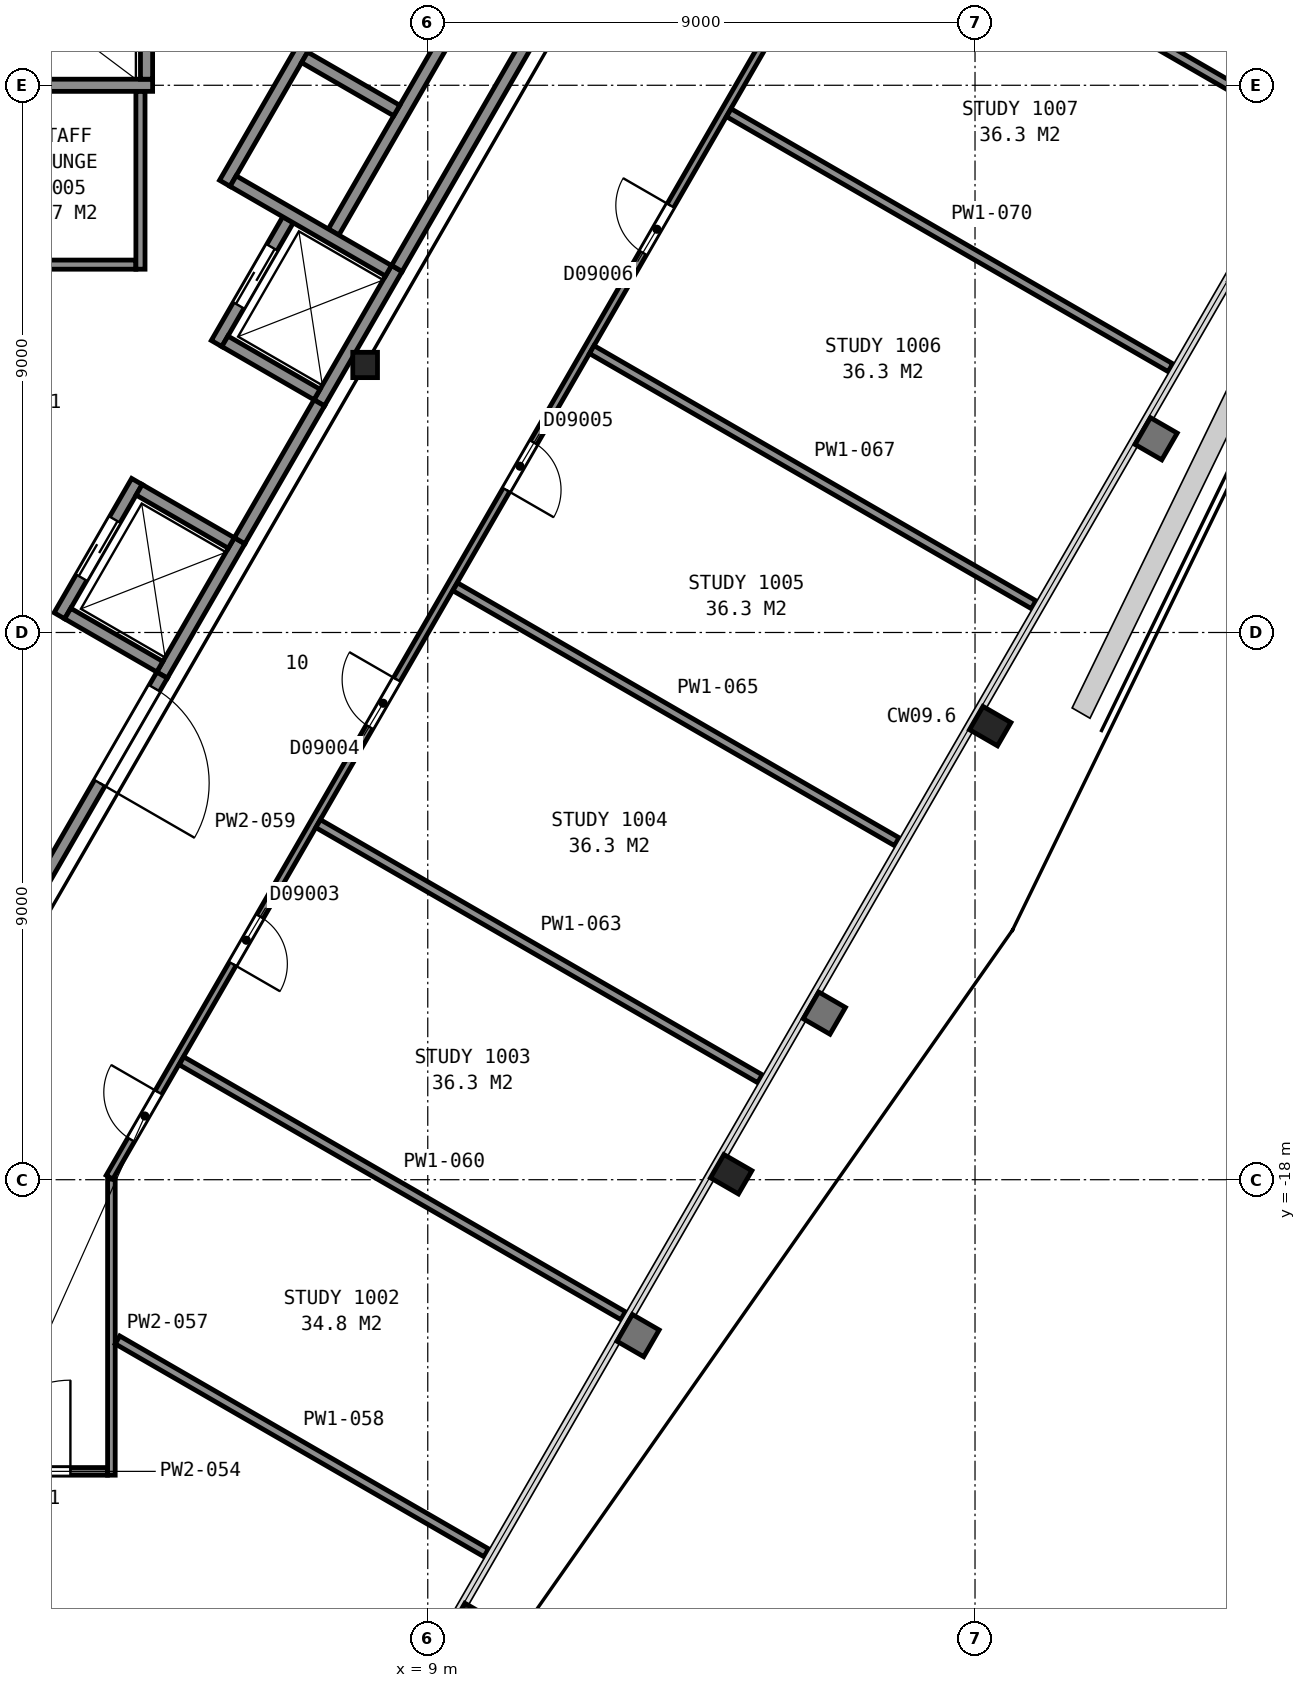
"""IFC4 building model, lengths in metres.
Left out: names, types, materials, properties, quantities, classifications, styles, units other than length and angle.
Written with IfcOpenShell. Run it as: python <this file> out.ifc"""

import sys

from ifc_helpers import new_model, si_unit, direction, frame, frame_2d, origin, origin_2d, place, context, subcontext, project, spatial, rectangle, i_section, extrude, element, fill, save


model = new_model("IFC4")
c1 = context("Model", 3, precision=1e-05, world=origin(), true_north=direction((0.0, 1.0)))
c2 = subcontext(c1, "Body", "Model", "MODEL_VIEW")
j1 = project(units=[si_unit("LENGTHUNIT", "METRE"), si_unit("PLANEANGLEUNIT", "RADIAN")], contexts=[c1])
p1 = place(None, origin())
s1 = spatial("IfcSite", under=j1, at=p1, CompositionType="ELEMENT")
p2 = place(p1, origin())
s2 = spatial("IfcBuilding", under=s1, at=p2, CompositionType="ELEMENT")
p3 = place(p2, frame((0.0, 0.0, 51.2)))
s3 = spatial("IfcBuildingStorey", under=s2, at=p3, CompositionType="ELEMENT", Elevation=51.2)
for number, where, z_axis, x_axis in (
    (1, (9.73, -25.29, 0.0), (0.0, 0.0, 1.0), (-0.5, -0.866, 0.0)),
    (2, (13.99, -17.91, 0.0), (0.0, 0.0, 1.0), (-0.5, -0.866, 0.0)),
    (3, (18.25, -10.54, 0.0), (0.0, 0.0, 1.0), (-0.5, -0.866, 0.0)),
):
    element("IfcColumn", number, at=place(p3, frame(where, z_axis=z_axis, x_axis=x_axis)), inside=s3, PredefinedType="COLUMN", context=c2, shape_type="SweptSolid", body=[
        extrude(i_section(OverallWidth=0.442, OverallDepth=0.531, WebThickness=0.066, FlangeThickness=0.106, FilletRadius=0.015, at=origin_2d()), origin(), (0.0, 0.0, 1.0), 3.6),
    ])
p4 = place(p3, frame((7.97, -4.6, 0.0), z_axis=(0.0, 0.0, 1.0), x_axis=(1.0, 0.0, 0.0)))
e4 = element("IfcColumn", 4, at=p4, inside=s3, PredefinedType="COLUMN", context=c2, shape_type="SweptSolid", body=[
    extrude(i_section(OverallWidth=0.406, OverallDepth=0.417, WebThickness=0.03, FlangeThickness=0.048, FilletRadius=0.015, at=origin_2d()), origin(), (0.0, 0.0, 1.0), 3.6),
])
p5 = place(p3, frame((1.525, 0.0, 0.0), z_axis=(0.0, 0.0, 1.0), x_axis=(1.0, 0.0, 0.0)))
e5 = element("IfcWall", 5, at=p5, inside=s3, PredefinedType="PARTITIONING", context=c2, shape_type="SweptSolid", body=[
    extrude(rectangle(XDim=2.95, YDim=0.2, at=frame_2d((1.475, 0.0))), origin(), (0.0, 0.0, 1.0), 3.6),
])
p6 = place(p3, frame((4.63, -9.7, 0.0), z_axis=(0.0, 0.0, 1.0), x_axis=(0.500062241894, 0.865989465428, 0.0)))
e6 = element("IfcWall", 6, at=p6, inside=s3, PredefinedType="PARTITIONING", context=c2, shape_type="SweptSolid", body=[
    extrude(rectangle(XDim=2.55, YDim=0.2, at=frame_2d((1.275, 0.0))), origin(), (0.0, 0.0, 1.0), 3.6),
])
p7 = place(p3, frame((7.216, -5.222, 0.0), z_axis=(0.0, 0.0, 1.0), x_axis=(0.499990435942, 0.866030925526, 0.0)))
e7 = element("IfcWall", 7, at=p7, inside=s3, PredefinedType="PARTITIONING", context=c2, shape_type="SweptSolid", body=[
    extrude(rectangle(XDim=2.55, YDim=0.2, at=frame_2d((1.275, 0.0))), origin(), (0.0, 0.0, 1.0), 3.6),
])
p8 = place(p3, frame((7.451, -2.414, 0.0), z_axis=(0.0, 0.0, 1.0), x_axis=(0.500016218704, 0.866016039709, 0.0)))
e8 = element("IfcWall", 8, at=p8, inside=s3, PredefinedType="PARTITIONING", context=c2, shape_type="SweptSolid", body=[
    extrude(rectangle(XDim=4.7, YDim=0.2, at=frame_2d((2.35, 0.0))), origin(), (0.0, 0.0, 1.0), 3.6),
])
p9 = place(p3, frame((2.942, -8.725, 0.0), z_axis=(0.0, 0.0, 1.0), x_axis=(0.500020783669, 0.866013403995, 0.0)))
e9 = element("IfcWall", 9, at=p9, inside=s3, PredefinedType="PARTITIONING", context=c2, shape_type="SweptSolid", body=[
    extrude(rectangle(XDim=2.55, YDim=0.2, at=frame_2d((1.275, 0.0))), origin(), (0.0, 0.0, 1.0), 3.6),
])
p10 = place(p9, frame((0.725, 0.0, 0.0)))
e10 = element("IfcOpeningElement", 10, at=p10, cuts=e9, PredefinedType="OPENING", context=c2, shape_type="SweptSolid", body=[
    extrude(rectangle(XDim=1.1, YDim=2.1, at=frame_2d((0.55, 1.05))), frame((0.0, 0.11, 0.0), z_axis=(0.0, -1.0, 0.0), x_axis=(1.0, 0.0, 0.0)), (0.0, 0.0, 1.0), 0.22),
])
p11 = place(p3, frame((5.527, -4.247, 0.0), z_axis=(0.0, 0.0, 1.0), x_axis=(0.499938297808, 0.866061024631, 0.0)))
e11 = element("IfcWall", 11, at=p11, inside=s3, PredefinedType="PARTITIONING", context=c2, shape_type="SweptSolid", body=[
    extrude(rectangle(XDim=2.35, YDim=0.2, at=frame_2d((1.175, 0.0))), origin(), (0.0, 0.0, 1.0), 3.6),
])
p12 = place(p11, frame((0.725, 0.0, 0.0)))
e12 = element("IfcOpeningElement", 12, at=p12, cuts=e11, PredefinedType="OPENING", context=c2, shape_type="SweptSolid", body=[
    extrude(rectangle(XDim=1.1, YDim=2.1, at=frame_2d((0.55, 1.05))), frame((0.0, 0.11, 0.0), z_axis=(0.0, -1.0, 0.0), x_axis=(1.0, 0.0, 0.0)), (0.0, 0.0, 1.0), 0.22),
])
p13 = place(p3, frame((5.663, -1.612, 0.0), z_axis=(0.0, 0.0, 1.0), x_axis=(0.49998122708, 0.866036242063, 0.0)))
e13 = element("IfcWall", 13, at=p13, inside=s3, PredefinedType="PARTITIONING", context=c2, shape_type="SweptSolid", body=[
    extrude(rectangle(XDim=4.9, YDim=0.2, at=frame_2d((2.45, 0.0))), origin(), (0.0, 0.0, 1.0), 3.6),
])
p14 = place(p3, frame((4.375, 0.1, 0.0), z_axis=(0.0, 0.0, 1.0), x_axis=(0.0, 1.0, 0.0)))
e14 = element("IfcWall", 14, at=p14, inside=s3, PredefinedType="PARTITIONING", context=c2, shape_type="SweptSolid", body=[
    extrude(rectangle(XDim=1.95, YDim=0.2, at=frame_2d((0.975, 0.0))), origin(), (0.0, 0.0, 1.0), 3.6),
])
p15 = place(p3, frame((8.49, -0.416, 0.0), z_axis=(0.0, 0.0, 1.0), x_axis=(-0.866036909293, 0.499980071345, 0.0)))
e15 = element("IfcWall", 15, at=p15, inside=s3, PredefinedType="PARTITIONING", context=c2, shape_type="SweptSolid", body=[
    extrude(rectangle(XDim=1.75, YDim=0.2, at=frame_2d((0.875, 0.0))), origin(), (0.0, 0.0, 1.0), 3.6),
])
p16 = place(p3, frame((8.354, -3.051, 0.0), z_axis=(0.0, 0.0, 1.0), x_axis=(-0.866060182126, 0.499939757307, 0.0)))
e16 = element("IfcWall", 16, at=p16, inside=s3, PredefinedType="PARTITIONING", context=c2, shape_type="SweptSolid", body=[
    extrude(rectangle(XDim=2.95, YDim=0.2, at=frame_2d((1.475, 0.0))), origin(), (0.0, 0.0, 1.0), 3.6),
])
p17 = place(p3, frame((7.179, -5.086, 0.0), z_axis=(0.0, 0.0, 1.0), x_axis=(-0.866036909293, 0.499980071345, 0.0)))
e17 = element("IfcWall", 17, at=p17, inside=s3, PredefinedType="PARTITIONING", context=c2, shape_type="SweptSolid", body=[
    extrude(rectangle(XDim=1.75, YDim=0.2, at=frame_2d((0.875, 0.0))), origin(), (0.0, 0.0, 1.0), 3.6),
])
p18 = place(p3, frame((5.769, -7.528, 0.0), z_axis=(0.0, 0.0, 1.0), x_axis=(-0.866002029911, 0.500040482552, 0.0)))
e18 = element("IfcWall", 18, at=p18, inside=s3, PredefinedType="PARTITIONING", context=c2, shape_type="SweptSolid", body=[
    extrude(rectangle(XDim=1.75, YDim=0.2, at=frame_2d((0.875, 0.0))), origin(), (0.0, 0.0, 1.0), 3.6),
])
p19 = place(p3, frame((4.594, -9.563, 0.0), z_axis=(0.0, 0.0, 1.0), x_axis=(-0.866036909293, 0.499980071345, 0.0)))
e19 = element("IfcWall", 19, at=p19, inside=s3, PredefinedType="PARTITIONING", context=c2, shape_type="SweptSolid", body=[
    extrude(rectangle(XDim=1.75, YDim=0.2, at=frame_2d((0.875, 0.0))), origin(), (0.0, 0.0, 1.0), 3.6),
])
p20 = place(p3, frame((1.677, -14.815, 0.0), z_axis=(0.0, 0.0, 1.0), x_axis=(0.49999445743, 0.866028603765, 0.0)))
e20 = element("IfcWall", 20, at=p20, inside=s3, PredefinedType="PARTITIONING", context=c2, shape_type="SweptSolid", body=[
    extrude(rectangle(XDim=5.905, YDim=0.2, at=frame_2d((2.952, 0.0))), origin(), (0.0, 0.0, 1.0), 3.35),
])
p21 = place(p20, frame((3.855, 0.0, 0.0)))
e21 = element("IfcOpeningElement", 21, at=p21, cuts=e20, PredefinedType="OPENING", context=c2, shape_type="SweptSolid", body=[
    extrude(rectangle(XDim=1.8, YDim=2.1, at=frame_2d((0.9, 1.05))), frame((0.0, 0.11, 0.0), z_axis=(0.0, -1.0, 0.0), x_axis=(1.0, 0.0, 0.0)), (0.0, 0.0, 1.0), 0.22),
])
p22 = place(p3, frame((1.8, -2.95, 0.0), z_axis=(0.0, 0.0, 1.0), x_axis=(1.0, 0.0, 0.0)))
e22 = element("IfcWall", 22, at=p22, inside=s3, PredefinedType="PARTITIONING", context=c2, shape_type="SweptSolid", body=[
    extrude(rectangle(XDim=2.4, YDim=0.15, at=frame_2d((1.2, 0.0))), origin(), (0.0, 0.0, 1.0), 3.35),
])
p23 = place(p3, frame((4.275, -3.025, 0.0), z_axis=(0.0, 0.0, 1.0), x_axis=(0.0, 1.0, 0.0)))
e23 = element("IfcWall", 23, at=p23, inside=s3, PredefinedType="PARTITIONING", context=c2, shape_type="SweptSolid", body=[
    extrude(rectangle(XDim=2.923, YDim=0.15, at=frame_2d((1.461, 0.0))), origin(), (0.0, 0.0, 1.0), 3.35),
])
p24 = place(p3, frame((5.906, -7.49, 0.0), z_axis=(0.0, 0.0, 1.0), x_axis=(0.500252727967, 0.865879442048, 0.0)))
e24 = element("IfcWall", 24, at=p24, inside=s3, PredefinedType="PARTITIONING", context=c2, shape_type="SweptSolid", body=[
    extrude(rectangle(XDim=2.617, YDim=0.2, at=frame_2d((1.309, 0.0))), origin(), (0.0, 0.0, 1.0), 3.35),
])
p25 = place(p3, frame((8.492, -3.012, 0.0), z_axis=(0.0, 0.0, 1.0), x_axis=(0.499972957231, 0.866041016371, 0.0)))
e25 = element("IfcWall", 25, at=p25, inside=s3, PredefinedType="PARTITIONING", context=c2, shape_type="SweptSolid", body=[
    extrude(rectangle(XDim=10.349, YDim=0.2, at=frame_2d((5.174, 0.0))), origin(), (0.0, 0.0, 1.0), 3.35),
])
p26 = place(p3, frame((3.732, -22.797, 0.0), z_axis=(0.0, 0.0, 1.0), x_axis=(-1.0, 0.0, 0.0)))
e26 = element("IfcWall", 26, at=p26, inside=s3, PredefinedType="PARTITIONING", context=c2, shape_type="SweptSolid", body=[
    extrude(rectangle(XDim=2.822, YDim=0.125, at=frame_2d((1.411, 0.0))), origin(), (0.0, 0.0, 1.0), 2.613),
])
p27 = place(p26, frame((0.609, 0.0, 0.0)))
e27 = element("IfcOpeningElement", 27, at=p27, cuts=e26, PredefinedType="OPENING", context=c2, shape_type="SweptSolid", body=[
    extrude(rectangle(XDim=1.5, YDim=2.1, at=frame_2d((0.75, 1.05))), frame((0.0, 0.073, 0.0), z_axis=(0.0, -1.0, 0.0), x_axis=(1.0, 0.0, 0.0)), (0.0, 0.0, 1.0), 0.145),
])
p28 = place(p3, frame((3.797, -22.86, 0.0), z_axis=(0.0, 0.0, 1.0), x_axis=(0.0, 1.0, 0.0)))
e28 = element("IfcWall", 28, at=p28, inside=s3, PredefinedType="PARTITIONING", context=c2, shape_type="SweptSolid", body=[
    extrude(rectangle(XDim=4.87, YDim=0.125, at=frame_2d((2.435, 0.0))), origin(), (0.0, 0.0, 1.0), 2.613),
])
p29 = place(p3, frame((3.897, -20.635, 0.0), z_axis=(0.0, 0.0, 1.0), x_axis=(0.866031150847, -0.499990045664, 0.0)))
e29 = element("IfcWall", 29, at=p29, inside=s3, PredefinedType="PARTITIONING", context=c2, shape_type="SweptSolid", body=[
    extrude(rectangle(XDim=7.003, YDim=0.15, at=frame_2d((3.501, 0.0))), origin(), (0.0, 0.0, 1.0), 2.613),
])
p30 = place(p3, frame((17.833, 6.406, 0.0), z_axis=(0.0, 0.0, 1.0), x_axis=(-0.500002884005, -0.866023738697, 0.0)))
e30 = element("IfcWall", 30, at=p30, inside=s3, PredefinedType="PARTITIONING", context=c2, shape_type="SweptSolid", body=[
    extrude(rectangle(XDim=28.135, YDim=0.125, at=frame_2d((14.067, 0.0))), origin(), (0.0, 0.0, 1.0), 2.613),
])
p31 = place(p30, frame((26.522, 0.0, 0.0)))
e31 = element("IfcOpeningElement", 31, at=p31, cuts=e30, PredefinedType="OPENING", context=c2, shape_type="SweptSolid", body=[
    extrude(rectangle(XDim=0.9, YDim=2.1, at=frame_2d((0.45, 1.05))), frame((0.0, 0.073, 0.0), z_axis=(0.0, -1.0, 0.0), x_axis=(1.0, 0.0, 0.0)), (0.0, 0.0, 1.0), 0.145),
])
p32 = place(p30, frame((23.184, 0.0, 0.0)))
e32 = element("IfcOpeningElement", 32, at=p32, cuts=e30, PredefinedType="OPENING", context=c2, shape_type="SweptSolid", body=[
    extrude(rectangle(XDim=0.9, YDim=2.1, at=frame_2d((0.45, 1.05))), frame((0.0, 0.073, 0.0), z_axis=(0.0, -1.0, 0.0), x_axis=(1.0, 0.0, 0.0)), (0.0, 0.0, 1.0), 0.145),
])
p33 = place(p30, frame((18.683, 0.0, 0.0)))
e33 = element("IfcOpeningElement", 33, at=p33, cuts=e30, PredefinedType="OPENING", context=c2, shape_type="SweptSolid", body=[
    extrude(rectangle(XDim=0.9, YDim=2.1, at=frame_2d((0.45, 1.05))), frame((0.0, 0.073, 0.0), z_axis=(0.0, -1.0, 0.0), x_axis=(1.0, 0.0, 0.0)), (0.0, 0.0, 1.0), 0.145),
])
p34 = place(p30, frame((14.182, 0.0, 0.0)))
e34 = element("IfcOpeningElement", 34, at=p34, cuts=e30, PredefinedType="OPENING", context=c2, shape_type="SweptSolid", body=[
    extrude(rectangle(XDim=0.9, YDim=2.1, at=frame_2d((0.45, 1.05))), frame((0.0, 0.073, 0.0), z_axis=(0.0, -1.0, 0.0), x_axis=(1.0, 0.0, 0.0)), (0.0, 0.0, 1.0), 0.145),
])
p35 = place(p30, frame((9.681, 0.0, 0.0)))
e35 = element("IfcOpeningElement", 35, at=p35, cuts=e30, PredefinedType="OPENING", context=c2, shape_type="SweptSolid", body=[
    extrude(rectangle(XDim=0.9, YDim=2.1, at=frame_2d((0.45, 1.05))), frame((0.0, 0.073, 0.0), z_axis=(0.0, -1.0, 0.0), x_axis=(1.0, 0.0, 0.0)), (0.0, 0.0, 1.0), 0.145),
])
p36 = place(p30, frame((5.18, 0.0, 0.0)))
e36 = element("IfcOpeningElement", 36, at=p36, cuts=e30, PredefinedType="OPENING", context=c2, shape_type="SweptSolid", body=[
    extrude(rectangle(XDim=0.9, YDim=2.1, at=frame_2d((0.45, 1.05))), frame((0.0, 0.073, 0.0), z_axis=(0.0, -1.0, 0.0), x_axis=(1.0, 0.0, 0.0)), (0.0, 0.0, 1.0), 0.145),
])
p37 = place(p30, frame((1.278, 0.0, 0.0)))
e37 = element("IfcOpeningElement", 37, at=p37, cuts=e30, PredefinedType="OPENING", context=c2, shape_type="SweptSolid", body=[
    extrude(rectangle(XDim=0.9, YDim=2.1, at=frame_2d((0.45, 1.05))), frame((0.0, 0.073, 0.0), z_axis=(0.0, -1.0, 0.0), x_axis=(1.0, 0.0, 0.0)), (0.0, 0.0, 1.0), 0.145),
])
p38 = place(p3, frame((4.949, -16.044, 0.0), z_axis=(0.0, 0.0, 1.0), x_axis=(0.866040157966, -0.499974444137, 0.0)))
e38 = element("IfcWall", 38, at=p38, inside=s3, PredefinedType="PARTITIONING", context=c2, shape_type="SweptSolid", body=[
    extrude(rectangle(XDim=8.387, YDim=0.15, at=frame_2d((4.193, 0.0))), origin(), (0.0, 0.0, 1.0), 2.613),
])
p39 = place(p3, frame((7.196, -12.143, 0.0), z_axis=(0.0, 0.0, 1.0), x_axis=(0.866010672798, -0.500025513949, 0.0)))
e39 = element("IfcWall", 39, at=p39, inside=s3, PredefinedType="PARTITIONING", context=c2, shape_type="SweptSolid", body=[
    extrude(rectangle(XDim=8.391, YDim=0.15, at=frame_2d((4.196, 0.0))), origin(), (0.0, 0.0, 1.0), 2.613),
])
p40 = place(p3, frame((9.45, -8.248, 0.0), z_axis=(0.0, 0.0, 1.0), x_axis=(0.866040157966, -0.499974444137, 0.0)))
e40 = element("IfcWall", 40, at=p40, inside=s3, PredefinedType="PARTITIONING", context=c2, shape_type="SweptSolid", body=[
    extrude(rectangle(XDim=8.387, YDim=0.15, at=frame_2d((4.193, 0.0))), origin(), (0.0, 0.0, 1.0), 2.613),
])
p41 = place(p3, frame((11.697, -4.347, 0.0), z_axis=(0.0, 0.0, 1.0), x_axis=(0.866005348532, -0.500034735108, 0.0)))
e41 = element("IfcWall", 41, at=p41, inside=s3, PredefinedType="PARTITIONING", context=c2, shape_type="SweptSolid", body=[
    extrude(rectangle(XDim=8.392, YDim=0.15, at=frame_2d((4.196, 0.0))), origin(), (0.0, 0.0, 1.0), 2.613),
])
p42 = place(p3, frame((13.951, -0.452, 0.0), z_axis=(0.0, 0.0, 1.0), x_axis=(0.866027553047, -0.499996277349, 0.0)))
e42 = element("IfcWall", 42, at=p42, inside=s3, PredefinedType="PARTITIONING", context=c2, shape_type="SweptSolid", body=[
    extrude(rectangle(XDim=8.387, YDim=0.15, at=frame_2d((4.193, 0.0))), origin(), (0.0, 0.0, 1.0), 2.613),
])
p43 = place(p3, frame((16.202, 3.447, 0.0), z_axis=(0.0, 0.0, 1.0), x_axis=(0.866047434595, -0.499961839574, 0.0)))
e43 = element("IfcWall", 43, at=p43, inside=s3, PredefinedType="PARTITIONING", context=c2, shape_type="SweptSolid", body=[
    extrude(rectangle(XDim=8.387, YDim=0.15, at=frame_2d((4.193, 0.0))), origin(), (0.0, 0.0, 1.0), 2.613),
])
p44 = place(p10, origin())
e44 = element("IfcDoor", 44, at=p44, inside=s3, OperationType="SLIDING_TO_RIGHT", PredefinedType="DOOR", context=c2, shape_type="SweptSolid", body=[
    extrude(rectangle(XDim=1.1, YDim=2.1, at=frame_2d((0.55, 1.05))), frame((0.0, 0.025, 0.0), z_axis=(0.0, -1.0, 0.0), x_axis=(1.0, 0.0, 0.0)), (0.0, 0.0, 1.0), 0.05),
])
fill(e10, e44)
p45 = place(p12, origin())
e45 = element("IfcDoor", 45, at=p45, inside=s3, OperationType="SLIDING_TO_LEFT", PredefinedType="DOOR", context=c2, shape_type="SweptSolid", body=[
    extrude(rectangle(XDim=1.1, YDim=2.1, at=frame_2d((0.55, 1.05))), frame((0.0, 0.025, 0.0), z_axis=(0.0, -1.0, 0.0), x_axis=(1.0, 0.0, 0.0)), (0.0, 0.0, 1.0), 0.05),
])
fill(e12, e45)
p46 = place(p21, origin())
e46 = element("IfcDoor", 46, at=p46, inside=s3, OperationType="DOUBLE_DOOR_SINGLE_SWING", PredefinedType="DOOR", context=c2, shape_type="SweptSolid", body=[
    extrude(rectangle(XDim=1.8, YDim=2.1, at=frame_2d((0.9, 1.05))), frame((0.0, 0.025, 0.0), z_axis=(0.0, -1.0, 0.0), x_axis=(1.0, 0.0, 0.0)), (0.0, 0.0, 1.0), 0.05),
])
fill(e21, e46)
p47 = place(p27, origin())
e47 = element("IfcDoor", 47, at=p47, inside=s3, OperationType="DOUBLE_DOOR_SINGLE_SWING", PredefinedType="DOOR", context=c2, shape_type="SweptSolid", body=[
    extrude(rectangle(XDim=1.5, YDim=2.1, at=frame_2d((0.75, 1.05))), frame((0.0, 0.025, 0.0), z_axis=(0.0, -1.0, 0.0), x_axis=(1.0, 0.0, 0.0)), (0.0, 0.0, 1.0), 0.05),
])
fill(e27, e47)
p48 = place(p31, origin())
e48 = element("IfcDoor", 48, at=p48, inside=s3, OperationType="SINGLE_SWING_LEFT", PredefinedType="DOOR", context=c2, shape_type="SweptSolid", body=[
    extrude(rectangle(XDim=0.9, YDim=2.1, at=frame_2d((0.45, 1.05))), frame((0.0, 0.025, 0.0), z_axis=(0.0, -1.0, 0.0), x_axis=(1.0, 0.0, 0.0)), (0.0, 0.0, 1.0), 0.05),
])
fill(e31, e48)
p49 = place(p32, origin())
e49 = element("IfcDoor", 49, at=p49, inside=s3, OperationType="SINGLE_SWING_RIGHT", PredefinedType="DOOR", context=c2, shape_type="SweptSolid", body=[
    extrude(rectangle(XDim=0.9, YDim=2.1, at=frame_2d((0.45, 1.05))), frame((0.0, 0.025, 0.0), z_axis=(0.0, -1.0, 0.0), x_axis=(1.0, 0.0, 0.0)), (0.0, 0.0, 1.0), 0.05),
])
fill(e32, e49)
p50 = place(p33, origin())
e50 = element("IfcDoor", 50, at=p50, inside=s3, OperationType="SINGLE_SWING_LEFT", PredefinedType="DOOR", context=c2, shape_type="SweptSolid", body=[
    extrude(rectangle(XDim=0.9, YDim=2.1, at=frame_2d((0.45, 1.05))), frame((0.0, 0.025, 0.0), z_axis=(0.0, -1.0, 0.0), x_axis=(1.0, 0.0, 0.0)), (0.0, 0.0, 1.0), 0.05),
])
fill(e33, e50)
p51 = place(p34, origin())
e51 = element("IfcDoor", 51, at=p51, inside=s3, OperationType="SINGLE_SWING_RIGHT", PredefinedType="DOOR", context=c2, shape_type="SweptSolid", body=[
    extrude(rectangle(XDim=0.9, YDim=2.1, at=frame_2d((0.45, 1.05))), frame((0.0, 0.025, 0.0), z_axis=(0.0, -1.0, 0.0), x_axis=(1.0, 0.0, 0.0)), (0.0, 0.0, 1.0), 0.05),
])
fill(e34, e51)
p52 = place(p35, origin())
e52 = element("IfcDoor", 52, at=p52, inside=s3, OperationType="SINGLE_SWING_LEFT", PredefinedType="DOOR", context=c2, shape_type="SweptSolid", body=[
    extrude(rectangle(XDim=0.9, YDim=2.1, at=frame_2d((0.45, 1.05))), frame((0.0, 0.025, 0.0), z_axis=(0.0, -1.0, 0.0), x_axis=(1.0, 0.0, 0.0)), (0.0, 0.0, 1.0), 0.05),
])
fill(e35, e52)
save(model, sys.argv[1])
